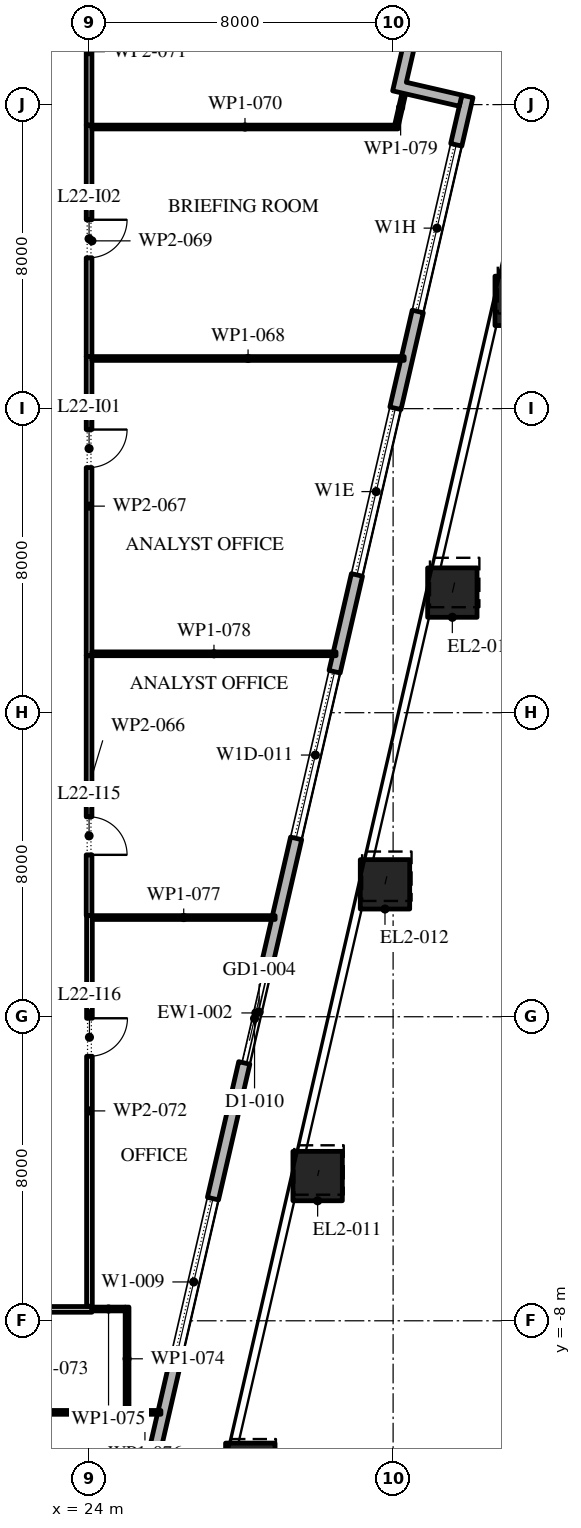
"""IFC4 building model, lengths in metres.
Left out: names, types, materials, properties, quantities, classifications, styles, units other than length and angle.
Written with IfcOpenShell. Run it as: python <this file> out.ifc"""

import sys

from ifc_helpers import new_model, si_unit, direction, frame, frame_2d, origin, origin_2d, place, context, subcontext, project, spatial, polyline, rectangle, outline, extrude, element, fill, save


model = new_model("IFC4")
c1 = context("Model", 3, precision=1e-05, world=origin(), true_north=direction((0.0, 1.0)))
c2 = subcontext(c1, "Body", "Model", "MODEL_VIEW")
j1 = project(units=[si_unit("LENGTHUNIT", "METRE"), si_unit("PLANEANGLEUNIT", "RADIAN")], contexts=[c1])
p1 = place(None, origin())
s1 = spatial("IfcSite", under=j1, at=p1, CompositionType="ELEMENT")
p2 = place(p1, origin())
s2 = spatial("IfcBuilding", under=s1, at=p2, CompositionType="ELEMENT")
p3 = place(p2, frame((0.0, 0.0, 105.6)))
s3 = spatial("IfcBuildingStorey", under=s2, at=p3, CompositionType="ELEMENT", Elevation=105.6)
p4 = place(p3, frame((28.242, -11.868, 0.0), z_axis=(0.005869091843, 0.025277771797, 0.999663237302), x_axis=(-0.974088391429, 0.226167649504, 0.0)))
e1 = element("IfcColumn", 1, at=p4, inside=s3, PredefinedType="COLUMN", context=c2, shape_type="SweptSolid", body=[
    extrude(rectangle(XDim=1.3, YDim=1.3, at=origin_2d()), origin(), (0.0, 0.0, 1.0), 4.201),
])
p5 = place(p3, frame((30.014, -4.192, 0.0), z_axis=(0.00871280379, 0.037929739166, 0.999242424008), x_axis=(-0.974617095667, 0.223878352757, 0.0)))
e2 = element("IfcColumn", 2, at=p5, inside=s3, PredefinedType="COLUMN", context=c2, shape_type="SweptSolid", body=[
    extrude(rectangle(XDim=1.3, YDim=1.3, at=origin_2d()), origin(), (0.0, 0.0, 1.0), 4.203),
])
p6 = place(p3, frame((31.786, 3.484, 0.0), z_axis=(0.011668267153, 0.050562490995, 0.998652735462), x_axis=(-0.974391195695, 0.224859506699, 0.0)))
e3 = element("IfcColumn", 3, at=p6, inside=s3, PredefinedType="COLUMN", context=c2, shape_type="SweptSolid", body=[
    extrude(rectangle(XDim=1.3, YDim=1.3, at=origin_2d()), origin(), (0.0, 0.0, 1.0), 4.206),
])
p7 = place(p3, frame((33.558, 11.16, 0.0), z_axis=(0.014559841898, 0.063111984005, 0.997900239743), x_axis=(-0.97440628778, 0.224794097641, 0.0)))
e4 = element("IfcColumn", 4, at=p7, inside=s3, PredefinedType="COLUMN", context=c2, shape_type="SweptSolid", body=[
    extrude(rectangle(XDim=1.3, YDim=1.3, at=origin_2d()), origin(), (0.0, 0.0, 1.0), 4.209),
])
p8 = place(p3, frame((35.331, 18.836, 0.0), z_axis=(0.01750210236, 0.075629945629, 0.996982340735), x_axis=(-0.974252605085, 0.225459223552, 0.0)))
e5 = element("IfcColumn", 5, at=p8, inside=s3, PredefinedType="COLUMN", context=c2, shape_type="SweptSolid", body=[
    extrude(rectangle(XDim=1.3, YDim=1.3, at=origin_2d()), origin(), (0.0, 0.0, 1.0), 4.213),
])
p9 = place(p3, frame((22.82, -24.016, 0.0), z_axis=(0.0, 0.0, 1.0), x_axis=(0.224953880882, 0.974369412223, 0.0)))
e6 = element("IfcWall", 6, at=p9, inside=s3, PredefinedType="STANDARD", context=c2, shape_type="SweptSolid", body=[
    extrude(rectangle(XDim=49.5, YDim=0.3, at=frame_2d((24.75, 0.0))), origin(), (0.0, 0.0, 1.0), 4.0),
])
p10 = place(p9, frame((1.157, 0.0, 0.45)))
e7 = element("IfcOpeningElement", 7, at=p10, cuts=e6, PredefinedType="OPENING", context=c2, shape_type="SweptSolid", body=[
    extrude(rectangle(XDim=4.5, YDim=3.05, at=frame_2d((2.25, 1.525))), frame((0.0, 0.16, 0.0), z_axis=(0.0, -1.0, 0.0), x_axis=(1.0, 0.0, 0.0)), (0.0, 0.0, 1.0), 0.32),
])
p11 = place(p9, frame((8.121, 0.0, 0.45)))
e8 = element("IfcOpeningElement", 8, at=p11, cuts=e6, PredefinedType="OPENING", context=c2, shape_type="SweptSolid", body=[
    extrude(rectangle(XDim=4.5, YDim=3.05, at=frame_2d((2.25, 1.525))), frame((0.0, 0.16, 0.0), z_axis=(0.0, -1.0, 0.0), x_axis=(1.0, 0.0, 0.0)), (0.0, 0.0, 1.0), 0.32),
])
p12 = place(p9, frame((15.236, 0.0, 0.45)))
e9 = element("IfcOpeningElement", 9, at=p12, cuts=e6, PredefinedType="OPENING", context=c2, shape_type="SweptSolid", body=[
    extrude(rectangle(XDim=4.5, YDim=3.05, at=frame_2d((2.25, 1.525))), frame((0.0, 0.16, 0.0), z_axis=(0.0, -1.0, 0.0), x_axis=(1.0, 0.0, 0.0)), (0.0, 0.0, 1.0), 0.32),
])
p13 = place(p9, frame((23.4, 0.0, 0.0)))
e10 = element("IfcOpeningElement", 10, at=p13, cuts=e6, PredefinedType="OPENING", context=c2, shape_type="SweptSolid", body=[
    extrude(rectangle(XDim=2.4, YDim=3.5, at=frame_2d((1.2, 1.75))), frame((0.0, 0.16, 0.0), z_axis=(0.0, -1.0, 0.0), x_axis=(1.0, 0.0, 0.0)), (0.0, 0.0, 1.0), 0.32),
])
p14 = place(p9, frame((29.464, 0.0, 0.45)))
e11 = element("IfcOpeningElement", 11, at=p14, cuts=e6, PredefinedType="OPENING", context=c2, shape_type="SweptSolid", body=[
    extrude(rectangle(XDim=4.5, YDim=2.875, at=frame_2d((2.25, 1.438))), frame((0.0, 0.16, 0.0), z_axis=(0.0, -1.0, 0.0), x_axis=(1.0, 0.0, 0.0)), (0.0, 0.0, 1.0), 0.32),
])
p15 = place(p9, frame((36.579, 0.0, 0.45)))
e12 = element("IfcOpeningElement", 12, at=p15, cuts=e6, PredefinedType="OPENING", context=c2, shape_type="SweptSolid", body=[
    extrude(rectangle(XDim=4.5, YDim=2.825, at=frame_2d((2.25, 1.413))), frame((0.0, 0.16, 0.0), z_axis=(0.0, -1.0, 0.0), x_axis=(1.0, 0.0, 0.0)), (0.0, 0.0, 1.0), 0.32),
])
p16 = place(p9, frame((43.693, 0.0, 0.45)))
e13 = element("IfcOpeningElement", 13, at=p16, cuts=e6, PredefinedType="OPENING", context=c2, shape_type="SweptSolid", body=[
    extrude(rectangle(XDim=4.5, YDim=2.75, at=frame_2d((2.25, 1.375))), frame((0.0, 0.16, 0.0), z_axis=(0.0, -1.0, 0.0), x_axis=(1.0, 0.0, 0.0)), (0.0, 0.0, 1.0), 0.32),
])
p17 = place(p3, origin())
e14 = element("IfcWall", 14, at=p17, inside=s3, PredefinedType="STANDARD", context=c2, shape_type="SweptSolid", body=[
    extrude(outline(polyline([(32.393, 26.116), (30.639, 26.521), (31.111, 28.567), (31.404, 28.5), (30.999, 26.746), (32.753, 26.341), (32.348, 24.587), (33.809, 24.25), (33.742, 23.957), (31.988, 24.362), (32.393, 26.116)])), origin(), (0.0, 0.0, 1.0), 4.0),
])
p18 = place(p3, frame((24.075, -7.7, 0.0), z_axis=(0.0, 0.0, 1.0), x_axis=(-1.0, 0.0, 0.0)))
e15 = element("IfcWall", 15, at=p18, inside=s3, PredefinedType="PARTITIONING", context=c2, shape_type="SweptSolid", body=[
    extrude(rectangle(XDim=10.025, YDim=0.15, at=frame_2d((5.012, 0.0))), origin(), (0.0, 0.0, 1.0), 4.0),
])
p19 = place(p18, frame((2.675, 0.0, 0.0)))
e16 = element("IfcOpeningElement", 16, at=p19, cuts=e15, PredefinedType="OPENING", context=c2, shape_type="SweptSolid", body=[
    extrude(rectangle(XDim=1.0, YDim=2.1, at=frame_2d((0.5, 1.05))), frame((0.0, 0.085, 0.0), z_axis=(0.0, -1.0, 0.0), x_axis=(1.0, 0.0, 0.0)), (0.0, 0.0, 1.0), 0.17),
])
p20 = place(p3, frame((24.0, 9.5, 0.0), z_axis=(0.0, 0.0, 1.0), x_axis=(0.0, -1.0, 0.0)))
e17 = element("IfcWall", 17, at=p20, inside=s3, PredefinedType="PARTITIONING", context=c2, shape_type="SweptSolid", body=[
    extrude(rectangle(XDim=6.84, YDim=0.15, at=frame_2d((3.42, 0.0))), origin(), (0.0, 0.0, 1.0), 4.0),
])
p21 = place(p20, frame((4.24, 0.0, 0.0)))
e18 = element("IfcOpeningElement", 18, at=p21, cuts=e17, PredefinedType="OPENING", context=c2, shape_type="SweptSolid", body=[
    extrude(rectangle(XDim=1.0, YDim=2.1, at=frame_2d((0.5, 1.05))), frame((0.0, 0.085, 0.0), z_axis=(0.0, -1.0, 0.0), x_axis=(1.0, 0.0, 0.0)), (0.0, 0.0, 1.0), 0.17),
])
p22 = place(p3, frame((24.0, 17.37, 0.0), z_axis=(0.0, 0.0, 1.0), x_axis=(0.0, -1.0, 0.0)))
e19 = element("IfcWall", 19, at=p22, inside=s3, PredefinedType="PARTITIONING", context=c2, shape_type="SweptSolid", body=[
    extrude(rectangle(XDim=7.87, YDim=0.15, at=frame_2d((3.935, 0.0))), origin(), (0.0, 0.0, 1.0), 4.0),
])
p23 = place(p22, frame((1.92, 0.0, 0.0)))
e20 = element("IfcOpeningElement", 20, at=p23, cuts=e19, PredefinedType="OPENING", context=c2, shape_type="SweptSolid", body=[
    extrude(rectangle(XDim=1.0, YDim=2.1, at=frame_2d((0.5, 1.05))), frame((0.0, 0.085, 0.0), z_axis=(0.0, -1.0, 0.0), x_axis=(1.0, 0.0, 0.0)), (0.0, 0.0, 1.0), 0.17),
])
p24 = place(p3, frame((24.075, 17.32, 0.0), z_axis=(0.0, 0.0, 1.0), x_axis=(1.0, 0.0, 0.0)))
e21 = element("IfcWall", 21, at=p24, inside=s3, PredefinedType="PARTITIONING", context=c2, shape_type="SweptSolid", body=[
    extrude(rectangle(XDim=8.217, YDim=0.1, at=frame_2d((4.108, 0.0))), origin(), (0.0, 0.0, 1.0), 4.0),
])
p25 = place(p3, frame((24.0, 23.46, 0.0), z_axis=(0.0, 0.0, 1.0), x_axis=(0.0, -1.0, 0.0)))
e22 = element("IfcWall", 22, at=p25, inside=s3, PredefinedType="PARTITIONING", context=c2, shape_type="SweptSolid", body=[
    extrude(rectangle(XDim=6.09, YDim=0.15, at=frame_2d((3.045, 0.0))), origin(), (0.0, 0.0, 1.0), 4.0),
])
p26 = place(p25, frame((2.49, 0.0, 0.0)))
e23 = element("IfcOpeningElement", 23, at=p26, cuts=e22, PredefinedType="OPENING", context=c2, shape_type="SweptSolid", body=[
    extrude(rectangle(XDim=1.0, YDim=2.1, at=frame_2d((0.5, 1.05))), frame((0.0, 0.085, 0.0), z_axis=(0.0, -1.0, 0.0), x_axis=(1.0, 0.0, 0.0)), (0.0, 0.0, 1.0), 0.17),
])
p27 = place(p3, frame((24.075, 23.41, 0.0), z_axis=(0.0, 0.0, 1.0), x_axis=(1.0, 0.0, 0.0)))
e24 = element("IfcWall", 24, at=p27, inside=s3, PredefinedType="PARTITIONING", context=c2, shape_type="SweptSolid", body=[
    extrude(rectangle(XDim=8.055, YDim=0.1, at=frame_2d((4.027, 0.0))), origin(), (0.0, 0.0, 1.0), 4.0),
])
p28 = place(p3, frame((24.0, 27.325, 0.0), z_axis=(0.0, 0.0, 1.0), x_axis=(0.0, -1.0, 0.0)))
e25 = element("IfcWall", 25, at=p28, inside=s3, PredefinedType="PARTITIONING", context=c2, shape_type="SweptSolid", body=[
    extrude(rectangle(XDim=3.865, YDim=0.15, at=frame_2d((1.933, 0.0))), origin(), (0.0, 0.0, 1.0), 4.0),
])
p29 = place(p3, frame((24.01, 2.66, 0.0), z_axis=(0.0, 0.0, 1.0), x_axis=(0.0, -1.0, 0.0)))
e26 = element("IfcWall", 26, at=p29, inside=s3, PredefinedType="PARTITIONING", context=c2, shape_type="SweptSolid", body=[
    extrude(rectangle(XDim=10.275, YDim=0.15, at=frame_2d((5.137, 0.0))), origin(), (0.0, 0.0, 1.0), 4.0),
])
p30 = place(p29, frame((2.7, 0.0, 0.0)))
e27 = element("IfcOpeningElement", 27, at=p30, cuts=e26, PredefinedType="OPENING", context=c2, shape_type="SweptSolid", body=[
    extrude(rectangle(XDim=1.0, YDim=2.1, at=frame_2d((0.5, 1.05))), frame((0.0, 0.085, 0.0), z_axis=(0.0, -1.0, 0.0), x_axis=(1.0, 0.0, 0.0)), (0.0, 0.0, 1.0), 0.17),
])
p31 = place(p3, frame((25.05, -10.41, 0.0), z_axis=(0.0, 0.0, 1.0), x_axis=(-1.0, 0.0, 0.0)))
e28 = element("IfcWall", 28, at=p31, inside=s3, PredefinedType="PARTITIONING", context=c2, shape_type="SweptSolid", body=[
    extrude(rectangle(XDim=6.35, YDim=0.1, at=frame_2d((3.175, 0.0))), origin(), (0.0, 0.0, 1.0), 4.0),
])
p32 = place(p31, frame((3.3, 0.0, 0.0)))
e29 = element("IfcOpeningElement", 29, at=p32, cuts=e28, PredefinedType="OPENING", context=c2, shape_type="SweptSolid", body=[
    extrude(rectangle(XDim=0.9, YDim=2.1, at=frame_2d((0.45, 1.05))), frame((0.0, 0.06, 0.0), z_axis=(0.0, -1.0, 0.0), x_axis=(1.0, 0.0, 0.0)), (0.0, 0.0, 1.0), 0.12),
])
p33 = place(p3, frame((25.0, -10.36, 0.0), z_axis=(0.0, 0.0, 1.0), x_axis=(0.0, 1.0, 0.0)))
e30 = element("IfcWall", 30, at=p33, inside=s3, PredefinedType="PARTITIONING", context=c2, shape_type="SweptSolid", body=[
    extrude(rectangle(XDim=2.72, YDim=0.1, at=frame_2d((1.36, 0.0))), origin(), (0.0, 0.0, 1.0), 4.0),
])
p34 = place(p3, frame((24.95, -7.69, 0.0), z_axis=(0.0, 0.0, 1.0), x_axis=(-1.0, 0.0, 0.0)))
e31 = element("IfcWall", 31, at=p34, inside=s3, PredefinedType="PARTITIONING", context=c2, shape_type="SweptSolid", body=[
    extrude(rectangle(XDim=0.875, YDim=0.1, at=frame_2d((0.438, 0.0))), origin(), (0.0, 0.0, 1.0), 4.0),
])
p35 = place(p3, frame((25.89, -10.41, 0.0), z_axis=(0.0, 0.0, 1.0), x_axis=(-1.0, 0.0, 0.0)))
e32 = element("IfcWall", 32, at=p35, inside=s3, PredefinedType="PARTITIONING", context=c2, shape_type="SweptSolid", body=[
    extrude(rectangle(XDim=0.84, YDim=0.1, at=frame_2d((0.42, 0.0))), origin(), (0.0, 0.0, 1.0), 4.0),
])
p36 = place(p3, frame((28.896, 2.61, 0.0), z_axis=(0.0, 0.0, 1.0), x_axis=(-1.0, 0.0, 0.0)))
e33 = element("IfcWall", 33, at=p36, inside=s3, PredefinedType="PARTITIONING", context=c2, shape_type="SweptSolid", body=[
    extrude(rectangle(XDim=4.811, YDim=0.1, at=frame_2d((2.406, 0.0))), origin(), (0.0, 0.0, 1.0), 4.0),
])
p37 = place(p3, frame((30.498, 9.55, 0.0), z_axis=(0.0, 0.0, 1.0), x_axis=(-1.0, 0.0, 0.0)))
e34 = element("IfcWall", 34, at=p37, inside=s3, PredefinedType="PARTITIONING", context=c2, shape_type="SweptSolid", body=[
    extrude(rectangle(XDim=6.423, YDim=0.1, at=frame_2d((3.211, 0.0))), origin(), (0.0, 0.0, 1.0), 4.0),
])
p38 = place(p3, frame((32.091, 23.459, 0.0), z_axis=(0.0, 0.0, 1.0), x_axis=(0.223406444343, 0.97472537703, 0.0)))
e35 = element("IfcWall", 35, at=p38, inside=s3, PredefinedType="PARTITIONING", context=c2, shape_type="SweptSolid", body=[
    extrude(rectangle(XDim=0.957, YDim=0.1, at=frame_2d((0.479, 0.0))), origin(), (0.0, 0.0, 1.0), 4.0),
])
p39 = place(p12, origin())
e36 = element("IfcWindow", 36, at=p39, inside=s3, PartitioningType="DOUBLE_PANEL_VERTICAL", PredefinedType="WINDOW", context=c2, shape_type="SweptSolid", body=[
    extrude(rectangle(XDim=4.5, YDim=3.05, at=frame_2d((2.25, 1.525))), frame((0.0, 0.03, 0.0), z_axis=(0.0, -1.0, 0.0), x_axis=(1.0, 0.0, 0.0)), (0.0, 0.0, 1.0), 0.06),
])
fill(e9, e36)
p40 = place(p13, origin())
e37 = element("IfcDoor", 37, at=p40, inside=s3, OperationType="DOUBLE_DOOR_SLIDING", PredefinedType="DOOR", context=c2, shape_type="SweptSolid", body=[
    extrude(rectangle(XDim=2.4, YDim=3.5, at=frame_2d((1.2, 1.75))), frame((0.0, 0.025, 0.0), z_axis=(0.0, -1.0, 0.0), x_axis=(1.0, 0.0, 0.0)), (0.0, 0.0, 1.0), 0.05),
])
fill(e10, e37)
p41 = place(p14, origin())
e38 = element("IfcWindow", 38, at=p41, inside=s3, PartitioningType="DOUBLE_PANEL_VERTICAL", PredefinedType="WINDOW", context=c2, shape_type="SweptSolid", body=[
    extrude(rectangle(XDim=4.5, YDim=2.875, at=frame_2d((2.25, 1.438))), frame((0.0, 0.03, 0.0), z_axis=(0.0, -1.0, 0.0), x_axis=(1.0, 0.0, 0.0)), (0.0, 0.0, 1.0), 0.06),
])
fill(e11, e38)
p42 = place(p15, origin())
e39 = element("IfcWindow", 39, at=p42, inside=s3, PartitioningType="DOUBLE_PANEL_VERTICAL", PredefinedType="WINDOW", context=c2, shape_type="SweptSolid", body=[
    extrude(rectangle(XDim=4.5, YDim=2.825, at=frame_2d((2.25, 1.413))), frame((0.0, 0.03, 0.0), z_axis=(0.0, -1.0, 0.0), x_axis=(1.0, 0.0, 0.0)), (0.0, 0.0, 1.0), 0.06),
])
fill(e12, e39)
p43 = place(p16, origin())
e40 = element("IfcWindow", 40, at=p43, inside=s3, PartitioningType="DOUBLE_PANEL_VERTICAL", PredefinedType="WINDOW", context=c2, shape_type="SweptSolid", body=[
    extrude(rectangle(XDim=4.5, YDim=2.75, at=frame_2d((2.25, 1.375))), frame((0.0, 0.03, 0.0), z_axis=(0.0, -1.0, 0.0), x_axis=(1.0, 0.0, 0.0)), (0.0, 0.0, 1.0), 0.06),
])
fill(e13, e40)
p44 = place(p23, origin())
e41 = element("IfcDoor", 41, at=p44, inside=s3, OperationType="SINGLE_SWING_RIGHT", PredefinedType="DOOR", context=c2, shape_type="SweptSolid", body=[
    extrude(rectangle(XDim=1.0, YDim=2.1, at=frame_2d((0.5, 1.05))), frame((0.0, 0.025, 0.0), z_axis=(0.0, -1.0, 0.0), x_axis=(1.0, 0.0, 0.0)), (0.0, 0.0, 1.0), 0.05),
])
fill(e20, e41)
p45 = place(p26, origin())
e42 = element("IfcDoor", 42, at=p45, inside=s3, OperationType="SINGLE_SWING_RIGHT", PredefinedType="DOOR", context=c2, shape_type="SweptSolid", body=[
    extrude(rectangle(XDim=1.0, YDim=2.1, at=frame_2d((0.5, 1.05))), frame((0.0, 0.025, 0.0), z_axis=(0.0, -1.0, 0.0), x_axis=(1.0, 0.0, 0.0)), (0.0, 0.0, 1.0), 0.05),
])
fill(e23, e42)
p46 = place(p21, origin())
e43 = element("IfcDoor", 43, at=p46, inside=s3, OperationType="SINGLE_SWING_LEFT", PredefinedType="DOOR", context=c2, shape_type="SweptSolid", body=[
    extrude(rectangle(XDim=1.0, YDim=2.1, at=frame_2d((0.5, 1.05))), frame((0.0, 0.025, 0.0), z_axis=(0.0, -1.0, 0.0), x_axis=(1.0, 0.0, 0.0)), (0.0, 0.0, 1.0), 0.05),
])
fill(e18, e43)
p47 = place(p30, origin())
e44 = element("IfcDoor", 44, at=p47, inside=s3, OperationType="SINGLE_SWING_RIGHT", PredefinedType="DOOR", context=c2, shape_type="SweptSolid", body=[
    extrude(rectangle(XDim=1.0, YDim=2.1, at=frame_2d((0.5, 1.05))), frame((0.0, 0.025, 0.0), z_axis=(0.0, -1.0, 0.0), x_axis=(1.0, 0.0, 0.0)), (0.0, 0.0, 1.0), 0.05),
])
fill(e27, e44)
save(model, sys.argv[1])
